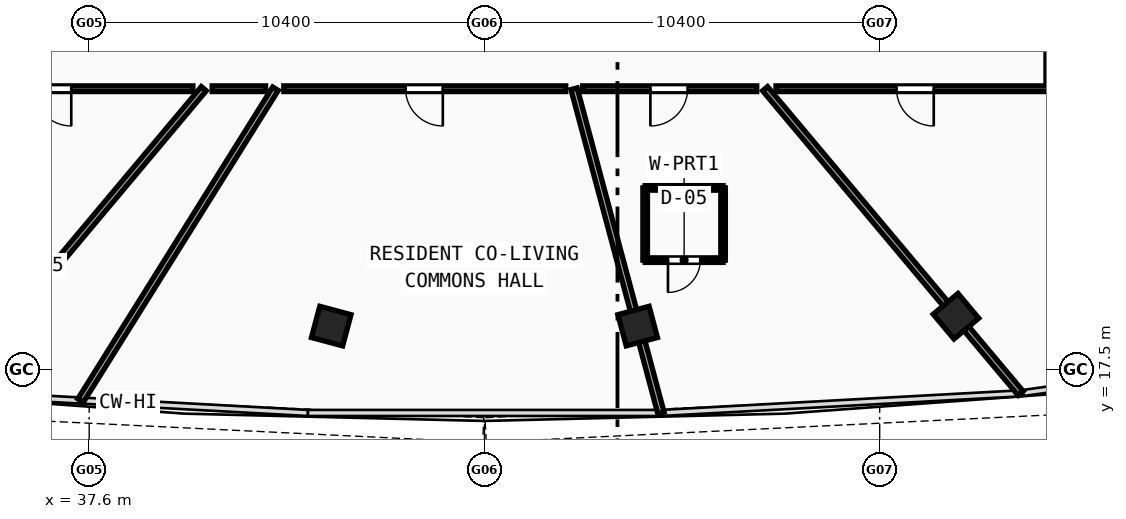
"""IFC4 building model, lengths in metres.
Left out: names, types, materials, properties, quantities, classifications, styles, units other than length and angle.
Written with IfcOpenShell. Run it as: python <this file> out.ifc"""

import sys

from ifc_helpers import new_model, si_unit, direction, frame, frame_2d, origin, origin_with_axes, origin_2d, place, context, subcontext, project, spatial, rectangle, hollow_rectangle, extrude, source, transform, mapped, element, fill, save


model = new_model("IFC4")
c1 = context("Model", 3, precision=1e-05, world=origin(), true_north=direction((0.0, 1.0)))
c2 = subcontext(c1, "Body", "Model", "MODEL_VIEW")
j1 = project(units=[si_unit("LENGTHUNIT", "METRE"), si_unit("PLANEANGLEUNIT", "RADIAN")], contexts=[c1])
p1 = place(None, origin())
s1 = spatial("IfcSite", under=j1, at=p1, CompositionType="ELEMENT")
p2 = place(p1, origin())
s2 = spatial("IfcBuilding", under=s1, at=p2, CompositionType="ELEMENT")
p3 = place(p2, frame((0.0, 0.0, 244.53)))
s3 = spatial("IfcBuildingStorey", under=s2, at=p3, CompositionType="ELEMENT", Elevation=244.53)
m1 = source(origin(), c2, "Body", "SweptSolid", [
    extrude(hollow_rectangle(XDim=0.85, YDim=0.85, WallThickness=0.034, at=origin_2d()), origin(), (0.0, 0.0, 1.0), 3.73),
])
for number, where, z_axis, x_axis in (
    (1, (43.969, 18.654, -0.26), (0.0, 0.0, 1.0), (0.966, -0.259, 0.0)),
    (2, (52.031, 18.654, -0.26), (0.0, 0.0, 1.0), (0.966, 0.259, 0.0)),
    (3, (60.407, 18.914, -0.26), (0.0, 0.0, 1.0), (0.766, 0.643, 0.0)),
):
    element("IfcColumn", number, at=place(p3, frame(where, z_axis=z_axis, x_axis=x_axis)), inside=s3, PredefinedType="COLUMN", context=c2, shape_type="MappedRepresentation", body=[
        mapped(m1, transform((0.0, 0.0, 0.0), scale=1.0)),
    ])
p4 = place(p3, frame((40.616, 24.9, 0.0), z_axis=(0.0, 0.0, 1.0), x_axis=(-0.642788120563, -0.766044014443, 0.0)))
e4 = element("IfcWall", 4, at=p4, inside=s3, PredefinedType="PARTITIONING", context=c2, shape_type="SweptSolid", body=[
    extrude(rectangle(XDim=10.462, YDim=0.17, at=frame_2d((5.231, 0.0))), origin(), (0.0, 0.0, 1.0), 2.82),
])
p5 = place(p3, frame((42.501, 24.9, 0.0), z_axis=(0.0, 0.0, 1.0), x_axis=(-0.529930889386, -0.848040831844, 0.0)))
e5 = element("IfcWall", 5, at=p5, inside=s3, PredefinedType="PARTITIONING", context=c2, shape_type="SweptSolid", body=[
    extrude(rectangle(XDim=9.675, YDim=0.17, at=frame_2d((4.837, 0.0))), origin(), (0.0, 0.0, 1.0), 2.82),
])
p6 = place(p3, frame((50.358, 24.9, 0.0), z_axis=(0.0, 0.0, 1.0), x_axis=(0.258813459388, -0.965927322959, 0.0)))
e6 = element("IfcWall", 6, at=p6, inside=s3, PredefinedType="PARTITIONING", context=c2, shape_type="SweptSolid", body=[
    extrude(rectangle(XDim=8.832, YDim=0.17, at=frame_2d((4.416, 0.0))), origin(), (0.0, 0.0, 1.0), 2.82),
])
p7 = place(p3, frame((55.384, 24.9, 0.0), z_axis=(0.0, 0.0, 1.0), x_axis=(0.642788120563, -0.766044014443, 0.0)))
e7 = element("IfcWall", 7, at=p7, inside=s3, PredefinedType="PARTITIONING", context=c2, shape_type="SweptSolid", body=[
    extrude(rectangle(XDim=10.462, YDim=0.17, at=frame_2d((5.231, 0.0))), origin(), (0.0, 0.0, 1.0), 2.82),
])
p8 = place(p3, frame((62.85, 30.858, 0.0), z_axis=(0.0, 0.0, 1.0), x_axis=(0.0, -1.0, 0.0)))
e8 = element("IfcWall", 8, at=p8, inside=s3, PredefinedType="PARTITIONING", context=c2, shape_type="SweptSolid", body=[
    extrude(rectangle(XDim=5.958, YDim=0.15, at=frame_2d((2.979, 0.0))), origin(), (0.0, 0.0, 1.0), 3.12),
])
p9 = place(p3, frame((62.85, 24.9, 0.0), z_axis=(0.0, 0.0, 1.0), x_axis=(-1.0, 0.0, 0.0)))
e9 = element("IfcWall", 9, at=p9, inside=s3, PredefinedType="PARTITIONING", context=c2, shape_type="SweptSolid", body=[
    extrude(rectangle(XDim=7.179, YDim=0.15, at=frame_2d((3.589, 0.0))), origin(), (0.0, 0.0, 1.0), 3.12),
])
p10 = place(p9, frame((3.028, 0.0, 0.0)))
e10 = element("IfcOpeningElement", 10, at=p10, cuts=e9, PredefinedType="OPENING", context=c2, shape_type="SweptSolid", body=[
    extrude(rectangle(XDim=0.98, YDim=2.12, at=frame_2d((0.49, 1.06))), frame((0.0, 0.085, 0.0), z_axis=(0.0, -1.0, 0.0), x_axis=(1.0, 0.0, 0.0)), (0.0, 0.0, 1.0), 0.17),
])
p11 = place(p3, frame((55.164, 24.9, 0.0), z_axis=(0.0, 0.0, 1.0), x_axis=(-1.0, 0.0, 0.0)))
e11 = element("IfcWall", 11, at=p11, inside=s3, PredefinedType="PARTITIONING", context=c2, shape_type="SweptSolid", body=[
    extrude(rectangle(XDim=4.579, YDim=0.15, at=frame_2d((2.289, 0.0))), origin(), (0.0, 0.0, 1.0), 2.82),
])
p12 = place(p11, frame((1.818, 0.0, 0.0)))
e12 = element("IfcOpeningElement", 12, at=p12, cuts=e11, PredefinedType="OPENING", context=c2, shape_type="SweptSolid", body=[
    extrude(rectangle(XDim=0.98, YDim=2.12, at=frame_2d((0.49, 1.06))), frame((0.0, 0.085, 0.0), z_axis=(0.0, -1.0, 0.0), x_axis=(1.0, 0.0, 0.0)), (0.0, 0.0, 1.0), 0.17),
])
p13 = place(p3, frame((50.138, 24.9, 0.0), z_axis=(0.0, 0.0, 1.0), x_axis=(-1.0, 0.0, 0.0)))
e13 = element("IfcWall", 13, at=p13, inside=s3, PredefinedType="PARTITIONING", context=c2, shape_type="SweptSolid", body=[
    extrude(rectangle(XDim=7.417, YDim=0.15, at=frame_2d((3.708, 0.0))), origin(), (0.0, 0.0, 1.0), 2.82),
])
p14 = place(p13, frame((3.234, 0.0, 0.0)))
e14 = element("IfcOpeningElement", 14, at=p14, cuts=e13, PredefinedType="OPENING", context=c2, shape_type="SweptSolid", body=[
    extrude(rectangle(XDim=0.98, YDim=2.12, at=frame_2d((0.49, 1.06))), frame((0.0, 0.085, 0.0), z_axis=(0.0, -1.0, 0.0), x_axis=(1.0, 0.0, 0.0)), (0.0, 0.0, 1.0), 0.17),
])
p15 = place(p3, frame((42.242, 24.9, 0.0), z_axis=(0.0, 0.0, 1.0), x_axis=(-1.0, 0.0, 0.0)))
e15 = element("IfcWall", 15, at=p15, inside=s3, PredefinedType="PARTITIONING", context=c2, shape_type="SweptSolid", body=[
    extrude(rectangle(XDim=1.406, YDim=0.15, at=frame_2d((0.703, 0.0))), origin(), (0.0, 0.0, 1.0), 2.82),
])
p16 = place(p3, frame((40.329, 24.9, 0.0), z_axis=(0.0, 0.0, 1.0), x_axis=(-1.0, 0.0, 0.0)))
e16 = element("IfcWall", 16, at=p16, inside=s3, PredefinedType="PARTITIONING", context=c2, shape_type="SweptSolid", body=[
    extrude(rectangle(XDim=7.179, YDim=0.15, at=frame_2d((3.589, 0.0))), origin(), (0.0, 0.0, 1.0), 3.12),
])
p17 = place(p16, frame((3.201, 0.0, 0.0)))
e17 = element("IfcOpeningElement", 17, at=p17, cuts=e16, PredefinedType="OPENING", context=c2, shape_type="SweptSolid", body=[
    extrude(rectangle(XDim=0.98, YDim=2.12, at=frame_2d((0.49, 1.06))), frame((0.0, 0.085, 0.0), z_axis=(0.0, -1.0, 0.0), x_axis=(1.0, 0.0, 0.0)), (0.0, 0.0, 1.0), 0.17),
])
p18 = place(p3, frame((52.229, 20.39, 0.0), z_axis=(0.0, 0.0, 1.0), x_axis=(1.0, 0.0, 0.0)))
e18 = element("IfcWall", 18, at=p18, inside=s3, PredefinedType="PARTITIONING", context=c2, shape_type="SweptSolid", body=[
    extrude(rectangle(XDim=2.05, YDim=0.12, at=frame_2d((1.025, 0.0))), origin(), (0.0, 0.0, 1.0), 3.47),
])
p19 = place(p18, frame((0.6, 0.0, 0.0)))
e19 = element("IfcOpeningElement", 19, at=p19, cuts=e18, PredefinedType="OPENING", context=c2, shape_type="SweptSolid", body=[
    extrude(rectangle(XDim=0.85, YDim=2.1, at=frame_2d((0.425, 1.05))), frame((0.0, 0.07, 0.0), z_axis=(0.0, -1.0, 0.0), x_axis=(1.0, 0.0, 0.0)), (0.0, 0.0, 1.0), 0.14),
])
p20 = place(p3, frame((54.279, 20.39, 0.0), z_axis=(0.0, 0.0, 1.0), x_axis=(0.0, 1.0, 0.0)))
e20 = element("IfcWall", 20, at=p20, inside=s3, PredefinedType="PARTITIONING", context=c2, shape_type="SweptSolid", body=[
    extrude(rectangle(XDim=1.9, YDim=0.12, at=frame_2d((0.95, 0.0))), origin(), (0.0, 0.0, 1.0), 3.12),
])
p21 = place(p3, frame((54.279, 22.29, 0.0), z_axis=(0.0, 0.0, 1.0), x_axis=(-1.0, 0.0, 0.0)))
e21 = element("IfcWall", 21, at=p21, inside=s3, PredefinedType="PARTITIONING", context=c2, shape_type="SweptSolid", body=[
    extrude(rectangle(XDim=2.05, YDim=0.12, at=frame_2d((1.025, 0.0))), origin(), (0.0, 0.0, 1.0), 3.47),
])
p22 = place(p3, frame((52.229, 22.29, 0.0), z_axis=(0.0, 0.0, 1.0), x_axis=(0.0, -1.0, 0.0)))
e22 = element("IfcWall", 22, at=p22, inside=s3, PredefinedType="PARTITIONING", context=c2, shape_type="SweptSolid", body=[
    extrude(rectangle(XDim=1.9, YDim=0.12, at=frame_2d((0.95, 0.0))), origin(), (0.0, 0.0, 1.0), 3.12),
])
m2 = source(origin(), c2, "Body", "SweptSolid", [
    extrude(rectangle(XDim=0.98, YDim=2.12, at=frame_2d((0.49, 1.06))), frame((0.0, 0.025, 0.0), z_axis=(0.0, -1.0, 0.0), x_axis=(1.0, 0.0, 0.0)), (0.0, 0.0, 1.0), 0.05),
])
p23 = place(p17, origin_with_axes())
e23 = element("IfcDoor", 23, at=p23, inside=s3, OperationType="SINGLE_SWING_LEFT", PredefinedType="DOOR", context=c2, shape_type="MappedRepresentation", body=[
    mapped(m2, transform((0.0, 0.0, 0.0), scale=1.0)),
])
fill(e17, e23)
p24 = place(p14, origin_with_axes())
e24 = element("IfcDoor", 24, at=p24, inside=s3, OperationType="SINGLE_SWING_LEFT", PredefinedType="DOOR", context=c2, shape_type="MappedRepresentation", body=[
    mapped(m2, transform((0.0, 0.0, 0.0), scale=1.0)),
])
fill(e14, e24)
p25 = place(p12, origin_with_axes())
e25 = element("IfcDoor", 25, at=p25, inside=s3, OperationType="SINGLE_SWING_RIGHT", PredefinedType="DOOR", context=c2, shape_type="MappedRepresentation", body=[
    mapped(m2, transform((0.0, 0.0, 0.0), scale=1.0)),
])
fill(e12, e25)
m3 = source(origin(), c2, "Body", "SweptSolid", [
    extrude(rectangle(XDim=0.85, YDim=2.1, at=frame_2d((0.425, 1.05))), frame((0.0, 0.025, 0.0), z_axis=(0.0, -1.0, 0.0), x_axis=(1.0, 0.0, 0.0)), (0.0, 0.0, 1.0), 0.05),
])
p26 = place(p19, frame((0.85, 0.0, 0.0), z_axis=(0.0, 0.0, 1.0), x_axis=(-1.0, 0.0, 0.0)))
e26 = element("IfcDoor", 26, at=p26, inside=s3, OperationType="SINGLE_SWING_RIGHT", PredefinedType="DOOR", context=c2, shape_type="MappedRepresentation", body=[
    mapped(m3, transform((0.0, 0.0, 0.0), scale=1.0)),
])
fill(e19, e26)
p27 = place(p10, origin_with_axes())
e27 = element("IfcDoor", 27, at=p27, inside=s3, OperationType="SINGLE_SWING_LEFT", PredefinedType="DOOR", context=c2, shape_type="MappedRepresentation", body=[
    mapped(m2, transform((0.0, 0.0, 0.0), scale=1.0)),
])
fill(e10, e27)
save(model, sys.argv[1])
